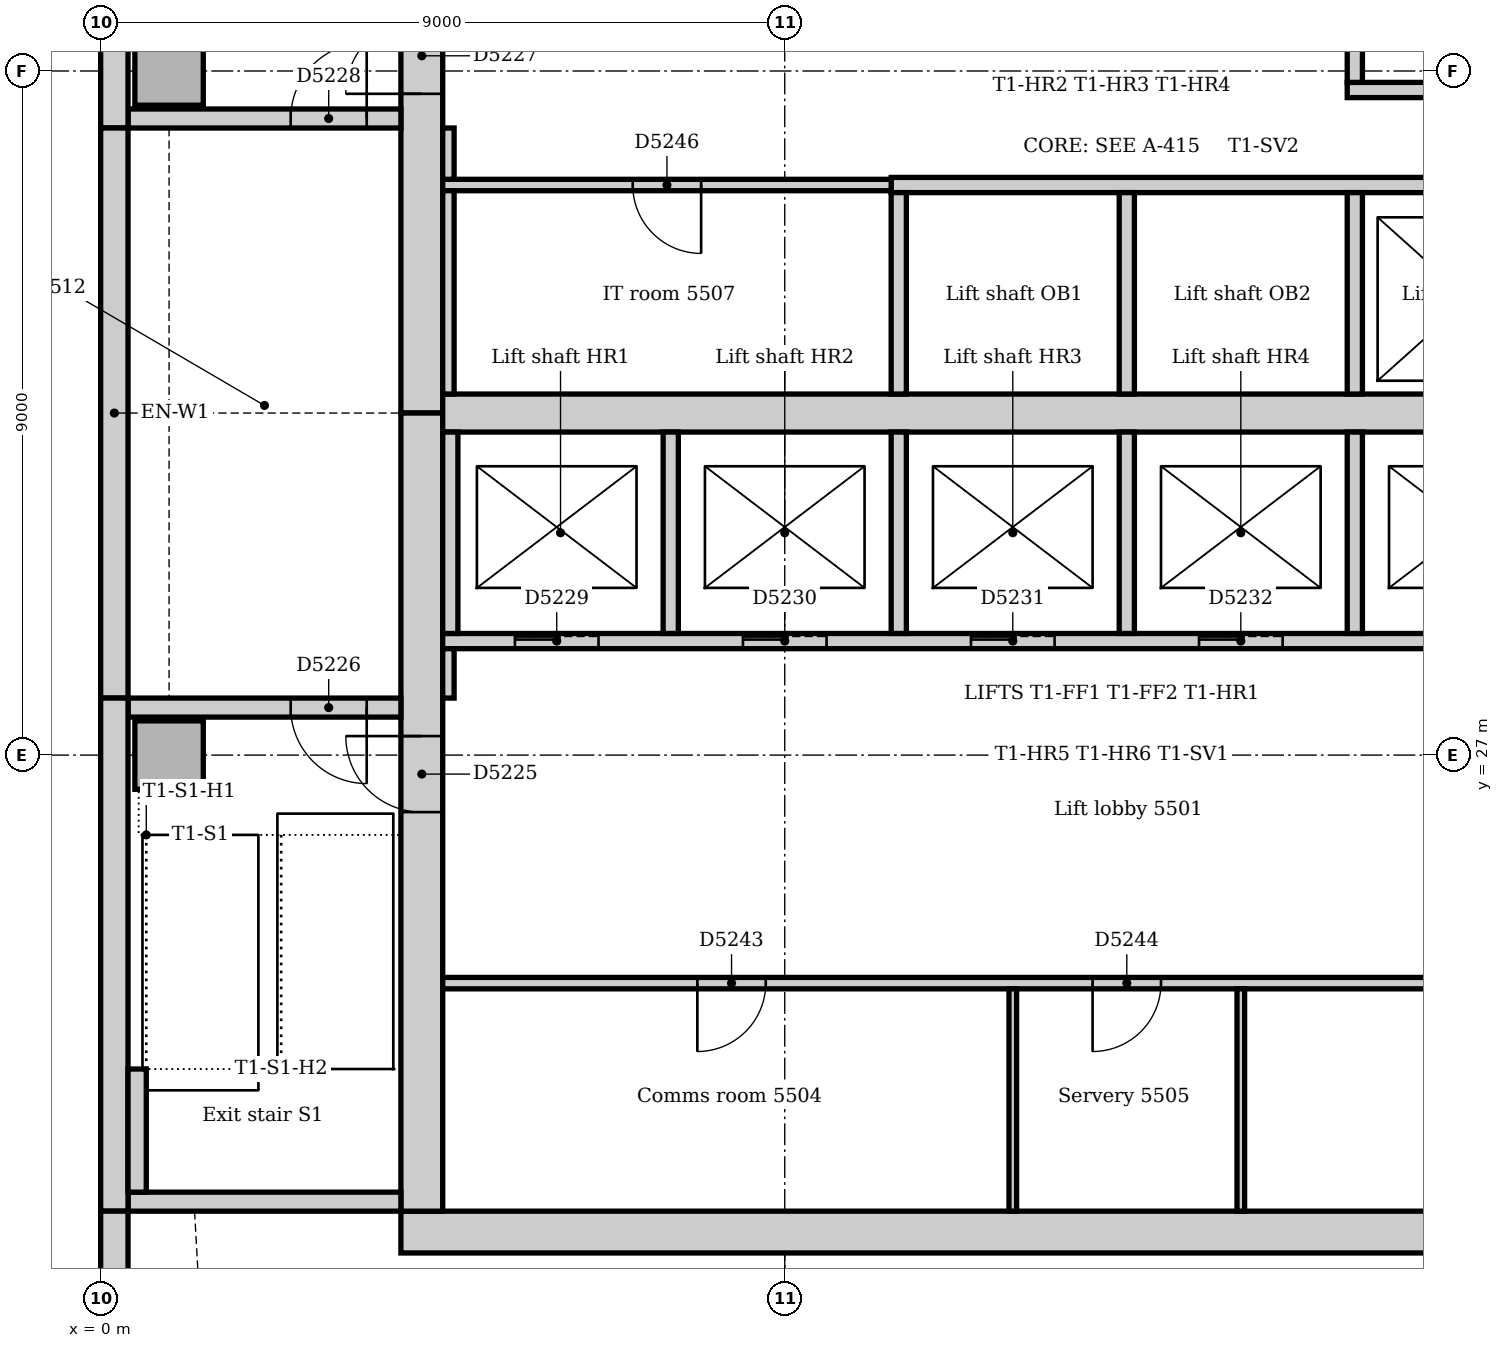
"""IFC4 building model, lengths in metres.
Left out: names, types, materials, properties, quantities, classifications, styles, units other than length and angle.
Written with IfcOpenShell. Run it as: python <this file> out.ifc"""

import sys

from ifc_helpers import new_model, si_unit, direction, frame, frame_2d, origin, origin_2d, place, context, subcontext, project, spatial, rectangle, extrude, element, fill, save


model = new_model("IFC4")
c1 = context("Model", 3, precision=1e-05, world=origin(), true_north=direction((0.0, 1.0)))
c2 = subcontext(c1, "Body", "Model", "MODEL_VIEW")
j1 = project(units=[si_unit("LENGTHUNIT", "METRE"), si_unit("PLANEANGLEUNIT", "RADIAN")], contexts=[c1])
p1 = place(None, origin())
s1 = spatial("IfcSite", under=j1, at=p1, CompositionType="ELEMENT")
p2 = place(p1, origin())
s2 = spatial("IfcBuilding", under=s1, at=p2, CompositionType="ELEMENT")
p3 = place(p2, frame((0.0, 0.0, 230.0)))
s3 = spatial("IfcBuildingStorey", under=s2, at=p3, CompositionType="ELEMENT", Elevation=230.0)
p4 = place(p3, frame((3.95, 20.725, 0.0), z_axis=(0.0, 0.0, 1.0), x_axis=(1.0, 0.0, 0.0)))
e1 = element("IfcWall", 1, at=p4, inside=s3, PredefinedType="SOLIDWALL", context=c2, shape_type="SweptSolid", body=[
    extrude(rectangle(XDim=19.1, YDim=0.55, at=frame_2d((9.55, 0.0))), origin(), (0.0, 0.0, 1.0), 4.0),
])
p5 = place(p3, frame((4.225, 42.0, 0.0), z_axis=(0.0, 0.0, 1.0), x_axis=(0.0, -1.0, 0.0)))
e2 = element("IfcWall", 2, at=p5, inside=s3, PredefinedType="SOLIDWALL", context=c2, shape_type="SweptSolid", body=[
    extrude(rectangle(XDim=10.5, YDim=0.55, at=frame_2d((5.25, 0.0))), origin(), (0.0, 0.0, 1.0), 4.0),
])
p6 = place(p5, frame((5.3, 0.0, 0.0)))
e3 = element("IfcOpeningElement", 3, at=p6, cuts=e2, PredefinedType="OPENING", context=c2, shape_type="SweptSolid", body=[
    extrude(rectangle(XDim=1.0, YDim=2.1, at=frame_2d((0.5, 1.05))), frame((0.0, 0.285, 0.0), z_axis=(0.0, -1.0, 0.0), x_axis=(1.0, 0.0, 0.0)), (0.0, 0.0, 1.0), 0.57),
])
p7 = place(p3, frame((4.225, 31.5, 0.0), z_axis=(0.0, 0.0, 1.0), x_axis=(0.0, -1.0, 0.0)))
e4 = element("IfcWall", 4, at=p7, inside=s3, PredefinedType="SOLIDWALL", context=c2, shape_type="SweptSolid", body=[
    extrude(rectangle(XDim=10.5, YDim=0.55, at=frame_2d((5.25, 0.0))), origin(), (0.0, 0.0, 1.0), 4.0),
])
p8 = place(p7, frame((4.25, 0.0, 0.0)))
e5 = element("IfcOpeningElement", 5, at=p8, cuts=e4, PredefinedType="OPENING", context=c2, shape_type="SweptSolid", body=[
    extrude(rectangle(XDim=1.0, YDim=2.1, at=frame_2d((0.5, 1.05))), frame((0.0, 0.285, 0.0), z_axis=(0.0, -1.0, 0.0), x_axis=(1.0, 0.0, 0.0)), (0.0, 0.0, 1.0), 0.57),
])
p9 = place(p3, frame((4.5, 31.5, 0.0), z_axis=(0.0, 0.0, 1.0), x_axis=(1.0, 0.0, 0.0)))
e6 = element("IfcWall", 6, at=p9, inside=s3, PredefinedType="SOLIDWALL", context=c2, shape_type="SweptSolid", body=[
    extrude(rectangle(XDim=18.0, YDim=0.5, at=frame_2d((9.0, 0.0))), origin(), (0.0, 0.0, 1.0), 4.0),
])
p10 = place(p3, frame((0.36, 21.125, 0.0), z_axis=(0.0, 0.0, 1.0), x_axis=(1.0, 0.0, 0.0)))
e7 = element("IfcWall", 7, at=p10, inside=s3, PredefinedType="SOLIDWALL", context=c2, shape_type="SweptSolid", body=[
    extrude(rectangle(XDim=3.59, YDim=0.25, at=frame_2d((1.795, 0.0))), origin(), (0.0, 0.0, 1.0), 4.0),
])
p11 = place(p3, frame((3.95, 27.625, 0.0), z_axis=(0.0, 0.0, 1.0), x_axis=(-1.0, 0.0, 0.0)))
e8 = element("IfcWall", 8, at=p11, inside=s3, PredefinedType="SOLIDWALL", context=c2, shape_type="SweptSolid", body=[
    extrude(rectangle(XDim=3.59, YDim=0.25, at=frame_2d((1.795, 0.0))), origin(), (0.0, 0.0, 1.0), 4.0),
])
p12 = place(p11, frame((0.45, 0.0, 0.0)))
e9 = element("IfcOpeningElement", 9, at=p12, cuts=e8, PredefinedType="OPENING", context=c2, shape_type="SweptSolid", body=[
    extrude(rectangle(XDim=1.0, YDim=2.1, at=frame_2d((0.5, 1.05))), frame((0.0, 0.135, 0.0), z_axis=(0.0, -1.0, 0.0), x_axis=(1.0, 0.0, 0.0)), (0.0, 0.0, 1.0), 0.27),
])
p13 = place(p3, frame((0.36, 35.375, 0.0), z_axis=(0.0, 0.0, 1.0), x_axis=(1.0, 0.0, 0.0)))
e10 = element("IfcWall", 10, at=p13, inside=s3, PredefinedType="SOLIDWALL", context=c2, shape_type="SweptSolid", body=[
    extrude(rectangle(XDim=3.59, YDim=0.25, at=frame_2d((1.795, 0.0))), origin(), (0.0, 0.0, 1.0), 4.0),
])
p14 = place(p13, frame((2.14, 0.0, 0.0)))
e11 = element("IfcOpeningElement", 11, at=p14, cuts=e10, PredefinedType="OPENING", context=c2, shape_type="SweptSolid", body=[
    extrude(rectangle(XDim=1.0, YDim=2.1, at=frame_2d((0.5, 1.05))), frame((0.0, 0.135, 0.0), z_axis=(0.0, -1.0, 0.0), x_axis=(1.0, 0.0, 0.0)), (0.0, 0.0, 1.0), 0.27),
])
for number, where, z_axis, x_axis in (
    (12, (0.9, 27.0, 0.0), (0.0, 0.0, 1.0), (1.0, 0.0, 0.0)),
    (13, (0.9, 36.0, 0.0), (0.0, 0.0, 1.0), (1.0, 0.0, 0.0)),
):
    element("IfcColumn", number, at=place(p3, frame(where, z_axis=z_axis, x_axis=x_axis)), inside=s3, PredefinedType="COLUMN", context=c2, shape_type="SweptSolid", body=[
        extrude(rectangle(XDim=0.9, YDim=0.9, at=origin_2d()), origin(), (0.0, 0.0, 1.0), 4.0),
    ])
p15 = place(p3, frame((0.18, 42.0, 0.0), z_axis=(0.0, 0.0, 1.0), x_axis=(0.0, -1.0, 0.0)))
e14 = element("IfcWall", 14, at=p15, inside=s3, PredefinedType="STANDARD", context=c2, shape_type="SweptSolid", body=[
    extrude(rectangle(XDim=6.75, YDim=0.36, at=frame_2d((3.375, 0.0))), origin(), (0.0, 0.0, 1.0), 3.85),
])
p16 = place(p3, frame((0.18, 35.25, 0.0), z_axis=(0.0, 0.0, 1.0), x_axis=(0.0, -1.0, 0.0)))
e15 = element("IfcWall", 15, at=p16, inside=s3, PredefinedType="STANDARD", context=c2, shape_type="SweptSolid", body=[
    extrude(rectangle(XDim=7.5, YDim=0.36, at=frame_2d((3.75, 0.0))), origin(), (0.0, 0.0, 1.0), 3.85),
])
p17 = place(p3, frame((0.18, 27.75, 0.0), z_axis=(0.0, 0.0, 1.0), x_axis=(0.0, -1.0, 0.0)))
e16 = element("IfcWall", 16, at=p17, inside=s3, PredefinedType="STANDARD", context=c2, shape_type="SweptSolid", body=[
    extrude(rectangle(XDim=6.75, YDim=0.36, at=frame_2d((3.375, 0.0))), origin(), (0.0, 0.0, 1.0), 3.85),
])
p18 = place(p3, frame((0.18, 21.0, 0.0), z_axis=(0.0, 0.0, 1.0), x_axis=(0.0, -1.0, 0.0)))
e17 = element("IfcWall", 17, at=p18, inside=s3, PredefinedType="STANDARD", context=c2, shape_type="SweptSolid", body=[
    extrude(rectangle(XDim=3.257, YDim=0.36, at=frame_2d((1.629, 0.0))), origin(), (0.0, 0.0, 1.0), 3.85),
])
p19 = place(p3, frame((0.48, 21.25, 0.0), z_axis=(0.0, 0.0, 1.0), x_axis=(0.0, 1.0, 0.0)))
e18 = element("IfcWall", 18, at=p19, inside=s3, PredefinedType="STANDARD", context=c2, shape_type="SweptSolid", body=[
    extrude(rectangle(XDim=1.62, YDim=0.24, at=frame_2d((0.81, 0.0))), origin(), (0.0, 0.0, 1.0), 4.0),
])
p20 = place(p3, frame((16.4, 35.75, 0.0), z_axis=(0.0, 0.0, 1.0), x_axis=(1.0, 0.0, 0.0)))
e19 = element("IfcWall", 19, at=p20, inside=s3, PredefinedType="PARTITIONING", context=c2, shape_type="SweptSolid", body=[
    extrude(rectangle(XDim=6.1, YDim=0.2, at=frame_2d((3.05, 0.0))), origin(), (0.0, 0.0, 1.0), 3.85),
])
p21 = place(p3, frame((16.5, 35.85, 0.0), z_axis=(0.0, 0.0, 1.0), x_axis=(0.0, 1.0, 0.0)))
e20 = element("IfcWall", 20, at=p21, inside=s3, PredefinedType="PARTITIONING", context=c2, shape_type="SweptSolid", body=[
    extrude(rectangle(XDim=2.55, YDim=0.2, at=frame_2d((1.275, 0.0))), origin(), (0.0, 0.0, 1.0), 3.85),
])
p22 = place(p3, frame((4.5, 28.5, 0.0), z_axis=(0.0, 0.0, 1.0), x_axis=(1.0, 0.0, 0.0)))
e21 = element("IfcWall", 21, at=p22, inside=s3, PredefinedType="PARTITIONING", context=c2, shape_type="SweptSolid", body=[
    extrude(rectangle(XDim=18.0, YDim=0.2, at=frame_2d((9.0, 0.0))), origin(), (0.0, 0.0, 1.0), 3.85),
])
p23 = place(p22, frame((0.95, 0.0, 0.0)))
e22 = element("IfcOpeningElement", 22, at=p23, cuts=e21, PredefinedType="OPENING", context=c2, shape_type="SweptSolid", body=[
    extrude(rectangle(XDim=1.1, YDim=2.1, at=frame_2d((0.55, 1.05))), frame((0.0, 0.11, 0.0), z_axis=(0.0, -1.0, 0.0), x_axis=(1.0, 0.0, 0.0)), (0.0, 0.0, 1.0), 0.22),
])
p24 = place(p22, frame((3.95, 0.0, 0.0)))
e23 = element("IfcOpeningElement", 23, at=p24, cuts=e21, PredefinedType="OPENING", context=c2, shape_type="SweptSolid", body=[
    extrude(rectangle(XDim=1.1, YDim=2.1, at=frame_2d((0.55, 1.05))), frame((0.0, 0.11, 0.0), z_axis=(0.0, -1.0, 0.0), x_axis=(1.0, 0.0, 0.0)), (0.0, 0.0, 1.0), 0.22),
])
p25 = place(p22, frame((6.95, 0.0, 0.0)))
e24 = element("IfcOpeningElement", 24, at=p25, cuts=e21, PredefinedType="OPENING", context=c2, shape_type="SweptSolid", body=[
    extrude(rectangle(XDim=1.1, YDim=2.1, at=frame_2d((0.55, 1.05))), frame((0.0, 0.11, 0.0), z_axis=(0.0, -1.0, 0.0), x_axis=(1.0, 0.0, 0.0)), (0.0, 0.0, 1.0), 0.22),
])
p26 = place(p22, frame((9.95, 0.0, 0.0)))
e25 = element("IfcOpeningElement", 25, at=p26, cuts=e21, PredefinedType="OPENING", context=c2, shape_type="SweptSolid", body=[
    extrude(rectangle(XDim=1.1, YDim=2.1, at=frame_2d((0.55, 1.05))), frame((0.0, 0.11, 0.0), z_axis=(0.0, -1.0, 0.0), x_axis=(1.0, 0.0, 0.0)), (0.0, 0.0, 1.0), 0.22),
])
p27 = place(p22, frame((12.95, 0.0, 0.0)))
e26 = element("IfcOpeningElement", 26, at=p27, cuts=e21, PredefinedType="OPENING", context=c2, shape_type="SweptSolid", body=[
    extrude(rectangle(XDim=1.1, YDim=2.1, at=frame_2d((0.55, 1.05))), frame((0.0, 0.11, 0.0), z_axis=(0.0, -1.0, 0.0), x_axis=(1.0, 0.0, 0.0)), (0.0, 0.0, 1.0), 0.22),
])
p28 = place(p22, frame((15.95, 0.0, 0.0)))
e27 = element("IfcOpeningElement", 27, at=p28, cuts=e21, PredefinedType="OPENING", context=c2, shape_type="SweptSolid", body=[
    extrude(rectangle(XDim=1.1, YDim=2.1, at=frame_2d((0.55, 1.05))), frame((0.0, 0.11, 0.0), z_axis=(0.0, -1.0, 0.0), x_axis=(1.0, 0.0, 0.0)), (0.0, 0.0, 1.0), 0.22),
])
p29 = place(p3, frame((10.4, 34.5, 0.0), z_axis=(0.0, 0.0, 1.0), x_axis=(1.0, 0.0, 0.0)))
e28 = element("IfcWall", 28, at=p29, inside=s3, PredefinedType="PARTITIONING", context=c2, shape_type="SweptSolid", body=[
    extrude(rectangle(XDim=12.1, YDim=0.2, at=frame_2d((6.05, 0.0))), origin(), (0.0, 0.0, 1.0), 3.85),
])
p30 = place(p29, frame((7.05, 0.0, 0.0)))
e29 = element("IfcOpeningElement", 29, at=p30, cuts=e28, PredefinedType="OPENING", context=c2, shape_type="SweptSolid", body=[
    extrude(rectangle(XDim=1.1, YDim=2.1, at=frame_2d((0.55, 1.05))), frame((0.0, 0.11, 0.0), z_axis=(0.0, -1.0, 0.0), x_axis=(1.0, 0.0, 0.0)), (0.0, 0.0, 1.0), 0.22),
])
p31 = place(p29, frame((10.05, 0.0, 0.0)))
e30 = element("IfcOpeningElement", 30, at=p31, cuts=e28, PredefinedType="OPENING", context=c2, shape_type="SweptSolid", body=[
    extrude(rectangle(XDim=1.1, YDim=2.1, at=frame_2d((0.55, 1.05))), frame((0.0, 0.11, 0.0), z_axis=(0.0, -1.0, 0.0), x_axis=(1.0, 0.0, 0.0)), (0.0, 0.0, 1.0), 0.22),
])
for number, where, z_axis, x_axis in (
    (31, (10.5, 28.6, 0.0), (0.0, 0.0, 1.0), (0.0, 1.0, 0.0)),
    (32, (10.5, 31.75, 0.0), (0.0, 0.0, 1.0), (0.0, 1.0, 0.0)),
    (33, (13.5, 28.6, 0.0), (0.0, 0.0, 1.0), (0.0, 1.0, 0.0)),
    (34, (13.5, 31.75, 0.0), (0.0, 0.0, 1.0), (0.0, 1.0, 0.0)),
    (35, (16.5, 28.6, 0.0), (0.0, 0.0, 1.0), (0.0, 1.0, 0.0)),
    (36, (16.5, 31.75, 0.0), (0.0, 0.0, 1.0), (0.0, 1.0, 0.0)),
    (37, (4.6, 28.6, 0.0), (0.0, 0.0, 1.0), (0.0, 1.0, 0.0)),
    (38, (7.5, 28.6, 0.0), (0.0, 0.0, 1.0), (0.0, 1.0, 0.0)),
):
    element("IfcWall", number, at=place(p3, frame(where, z_axis=z_axis, x_axis=x_axis)), inside=s3, PredefinedType="PARTITIONING", context=c2, shape_type="SweptSolid", body=[
        extrude(rectangle(XDim=2.65, YDim=0.2, at=frame_2d((1.325, 0.0))), origin(), (0.0, 0.0, 1.0), 3.85),
    ])
p32 = place(p3, frame((4.5, 24.0, 0.0), z_axis=(0.0, 0.0, 1.0), x_axis=(1.0, 0.0, 0.0)))
e39 = element("IfcWall", 39, at=p32, inside=s3, PredefinedType="PARTITIONING", context=c2, shape_type="SweptSolid", body=[
    extrude(rectangle(XDim=18.0, YDim=0.15, at=frame_2d((9.0, 0.0))), origin(), (0.0, 0.0, 1.0), 3.85),
])
p33 = place(p32, frame((3.35, 0.0, 0.0)))
e40 = element("IfcOpeningElement", 40, at=p33, cuts=e39, PredefinedType="OPENING", context=c2, shape_type="SweptSolid", body=[
    extrude(rectangle(XDim=0.9, YDim=2.1, at=frame_2d((0.45, 1.05))), frame((0.0, 0.085, 0.0), z_axis=(0.0, -1.0, 0.0), x_axis=(1.0, 0.0, 0.0)), (0.0, 0.0, 1.0), 0.17),
])
p34 = place(p32, frame((8.55, 0.0, 0.0)))
e41 = element("IfcOpeningElement", 41, at=p34, cuts=e39, PredefinedType="OPENING", context=c2, shape_type="SweptSolid", body=[
    extrude(rectangle(XDim=0.9, YDim=2.1, at=frame_2d((0.45, 1.05))), frame((0.0, 0.085, 0.0), z_axis=(0.0, -1.0, 0.0), x_axis=(1.0, 0.0, 0.0)), (0.0, 0.0, 1.0), 0.17),
])
p35 = place(p32, frame((13.7, 0.0, 0.0)))
e42 = element("IfcOpeningElement", 42, at=p35, cuts=e39, PredefinedType="OPENING", context=c2, shape_type="SweptSolid", body=[
    extrude(rectangle(XDim=0.9, YDim=2.1, at=frame_2d((0.45, 1.05))), frame((0.0, 0.085, 0.0), z_axis=(0.0, -1.0, 0.0), x_axis=(1.0, 0.0, 0.0)), (0.0, 0.0, 1.0), 0.17),
])
p36 = place(p3, frame((4.5, 34.5, 0.0), z_axis=(0.0, 0.0, 1.0), x_axis=(1.0, 0.0, 0.0)))
e43 = element("IfcWall", 43, at=p36, inside=s3, PredefinedType="PARTITIONING", context=c2, shape_type="SweptSolid", body=[
    extrude(rectangle(XDim=5.9, YDim=0.15, at=frame_2d((2.95, 0.0))), origin(), (0.0, 0.0, 1.0), 3.85),
])
p37 = place(p36, frame((2.5, 0.0, 0.0)))
e44 = element("IfcOpeningElement", 44, at=p37, cuts=e43, PredefinedType="OPENING", context=c2, shape_type="SweptSolid", body=[
    extrude(rectangle(XDim=0.9, YDim=2.1, at=frame_2d((0.45, 1.05))), frame((0.0, 0.085, 0.0), z_axis=(0.0, -1.0, 0.0), x_axis=(1.0, 0.0, 0.0)), (0.0, 0.0, 1.0), 0.17),
])
p38 = place(p3, frame((4.575, 34.575, 0.0), z_axis=(0.0, 0.0, 1.0), x_axis=(0.0, 1.0, 0.0)))
e45 = element("IfcWall", 45, at=p38, inside=s3, PredefinedType="PARTITIONING", context=c2, shape_type="SweptSolid", body=[
    extrude(rectangle(XDim=0.675, YDim=0.15, at=frame_2d((0.338, 0.0))), origin(), (0.0, 0.0, 1.0), 3.85),
])
p39 = place(p3, frame((4.575, 31.75, 0.0), z_axis=(0.0, 0.0, 1.0), x_axis=(0.0, 1.0, 0.0)))
e46 = element("IfcWall", 46, at=p39, inside=s3, PredefinedType="PARTITIONING", context=c2, shape_type="SweptSolid", body=[
    extrude(rectangle(XDim=2.675, YDim=0.15, at=frame_2d((1.337, 0.0))), origin(), (0.0, 0.0, 1.0), 3.85),
])
p40 = place(p3, frame((4.575, 27.75, 0.0), z_axis=(0.0, 0.0, 1.0), x_axis=(0.0, 1.0, 0.0)))
e47 = element("IfcWall", 47, at=p40, inside=s3, PredefinedType="PARTITIONING", context=c2, shape_type="SweptSolid", body=[
    extrude(rectangle(XDim=0.65, YDim=0.15, at=frame_2d((0.325, 0.0))), origin(), (0.0, 0.0, 1.0), 3.85),
])
for number, where, z_axis, x_axis in (
    (48, (12.0, 21.0, 0.0), (0.0, 0.0, 1.0), (0.0, 1.0, 0.0)),
    (49, (15.0, 21.0, 0.0), (0.0, 0.0, 1.0), (0.0, 1.0, 0.0)),
):
    element("IfcWall", number, at=place(p3, frame(where, z_axis=z_axis, x_axis=x_axis)), inside=s3, PredefinedType="PARTITIONING", context=c2, shape_type="SweptSolid", body=[
        extrude(rectangle(XDim=2.925, YDim=0.1, at=frame_2d((1.462, 0.0))), origin(), (0.0, 0.0, 1.0), 3.85),
    ])
p41 = place(p8, frame((1.0, 0.0, 0.0), z_axis=(0.0, 0.0, 1.0), x_axis=(-1.0, 0.0, 0.0)))
e50 = element("IfcDoor", 50, at=p41, inside=s3, OperationType="SINGLE_SWING_RIGHT", PredefinedType="DOOR", context=c2, shape_type="SweptSolid", body=[
    extrude(rectangle(XDim=1.0, YDim=2.1, at=frame_2d((0.5, 1.05))), frame((0.0, 0.025, 0.0), z_axis=(0.0, -1.0, 0.0), x_axis=(1.0, 0.0, 0.0)), (0.0, 0.0, 1.0), 0.05),
])
fill(e5, e50)
p42 = place(p12, origin())
e51 = element("IfcDoor", 51, at=p42, inside=s3, OperationType="SINGLE_SWING_LEFT", PredefinedType="DOOR", context=c2, shape_type="SweptSolid", body=[
    extrude(rectangle(XDim=1.0, YDim=2.1, at=frame_2d((0.5, 1.05))), frame((0.0, 0.025, 0.0), z_axis=(0.0, -1.0, 0.0), x_axis=(1.0, 0.0, 0.0)), (0.0, 0.0, 1.0), 0.05),
])
fill(e9, e51)
p43 = place(p6, frame((1.0, 0.0, 0.0), z_axis=(0.0, 0.0, 1.0), x_axis=(-1.0, 0.0, 0.0)))
e52 = element("IfcDoor", 52, at=p43, inside=s3, OperationType="SINGLE_SWING_LEFT", PredefinedType="DOOR", context=c2, shape_type="SweptSolid", body=[
    extrude(rectangle(XDim=1.0, YDim=2.1, at=frame_2d((0.5, 1.05))), frame((0.0, 0.025, 0.0), z_axis=(0.0, -1.0, 0.0), x_axis=(1.0, 0.0, 0.0)), (0.0, 0.0, 1.0), 0.05),
])
fill(e3, e52)
p44 = place(p14, origin())
e53 = element("IfcDoor", 53, at=p44, inside=s3, OperationType="SINGLE_SWING_RIGHT", PredefinedType="DOOR", context=c2, shape_type="SweptSolid", body=[
    extrude(rectangle(XDim=1.0, YDim=2.1, at=frame_2d((0.5, 1.05))), frame((0.0, 0.025, 0.0), z_axis=(0.0, -1.0, 0.0), x_axis=(1.0, 0.0, 0.0)), (0.0, 0.0, 1.0), 0.05),
])
fill(e11, e53)
p45 = place(p23, origin())
e54 = element("IfcDoor", 54, at=p45, inside=s3, OperationType="SLIDING_TO_LEFT", PredefinedType="DOOR", context=c2, shape_type="SweptSolid", body=[
    extrude(rectangle(XDim=1.1, YDim=2.1, at=frame_2d((0.55, 1.05))), frame((0.0, 0.025, 0.0), z_axis=(0.0, -1.0, 0.0), x_axis=(1.0, 0.0, 0.0)), (0.0, 0.0, 1.0), 0.05),
])
fill(e22, e54)
p46 = place(p24, origin())
e55 = element("IfcDoor", 55, at=p46, inside=s3, OperationType="SLIDING_TO_LEFT", PredefinedType="DOOR", context=c2, shape_type="SweptSolid", body=[
    extrude(rectangle(XDim=1.1, YDim=2.1, at=frame_2d((0.55, 1.05))), frame((0.0, 0.025, 0.0), z_axis=(0.0, -1.0, 0.0), x_axis=(1.0, 0.0, 0.0)), (0.0, 0.0, 1.0), 0.05),
])
fill(e23, e55)
p47 = place(p25, origin())
e56 = element("IfcDoor", 56, at=p47, inside=s3, OperationType="SLIDING_TO_LEFT", PredefinedType="DOOR", context=c2, shape_type="SweptSolid", body=[
    extrude(rectangle(XDim=1.1, YDim=2.1, at=frame_2d((0.55, 1.05))), frame((0.0, 0.025, 0.0), z_axis=(0.0, -1.0, 0.0), x_axis=(1.0, 0.0, 0.0)), (0.0, 0.0, 1.0), 0.05),
])
fill(e24, e56)
p48 = place(p26, origin())
e57 = element("IfcDoor", 57, at=p48, inside=s3, OperationType="SLIDING_TO_LEFT", PredefinedType="DOOR", context=c2, shape_type="SweptSolid", body=[
    extrude(rectangle(XDim=1.1, YDim=2.1, at=frame_2d((0.55, 1.05))), frame((0.0, 0.025, 0.0), z_axis=(0.0, -1.0, 0.0), x_axis=(1.0, 0.0, 0.0)), (0.0, 0.0, 1.0), 0.05),
])
fill(e25, e57)
p49 = place(p33, frame((0.9, 0.0, 0.0), z_axis=(0.0, 0.0, 1.0), x_axis=(-1.0, 0.0, 0.0)))
e58 = element("IfcDoor", 58, at=p49, inside=s3, OperationType="SINGLE_SWING_RIGHT", PredefinedType="DOOR", context=c2, shape_type="SweptSolid", body=[
    extrude(rectangle(XDim=0.9, YDim=2.1, at=frame_2d((0.45, 1.05))), frame((0.0, 0.025, 0.0), z_axis=(0.0, -1.0, 0.0), x_axis=(1.0, 0.0, 0.0)), (0.0, 0.0, 1.0), 0.05),
])
fill(e40, e58)
p50 = place(p34, frame((0.9, 0.0, 0.0), z_axis=(0.0, 0.0, 1.0), x_axis=(-1.0, 0.0, 0.0)))
e59 = element("IfcDoor", 59, at=p50, inside=s3, OperationType="SINGLE_SWING_RIGHT", PredefinedType="DOOR", context=c2, shape_type="SweptSolid", body=[
    extrude(rectangle(XDim=0.9, YDim=2.1, at=frame_2d((0.45, 1.05))), frame((0.0, 0.025, 0.0), z_axis=(0.0, -1.0, 0.0), x_axis=(1.0, 0.0, 0.0)), (0.0, 0.0, 1.0), 0.05),
])
fill(e41, e59)
p51 = place(p37, frame((0.9, 0.0, 0.0), z_axis=(0.0, 0.0, 1.0), x_axis=(-1.0, 0.0, 0.0)))
e60 = element("IfcDoor", 60, at=p51, inside=s3, OperationType="SINGLE_SWING_LEFT", PredefinedType="DOOR", context=c2, shape_type="SweptSolid", body=[
    extrude(rectangle(XDim=0.9, YDim=2.1, at=frame_2d((0.45, 1.05))), frame((0.0, 0.025, 0.0), z_axis=(0.0, -1.0, 0.0), x_axis=(1.0, 0.0, 0.0)), (0.0, 0.0, 1.0), 0.05),
])
fill(e44, e60)
save(model, sys.argv[1])
